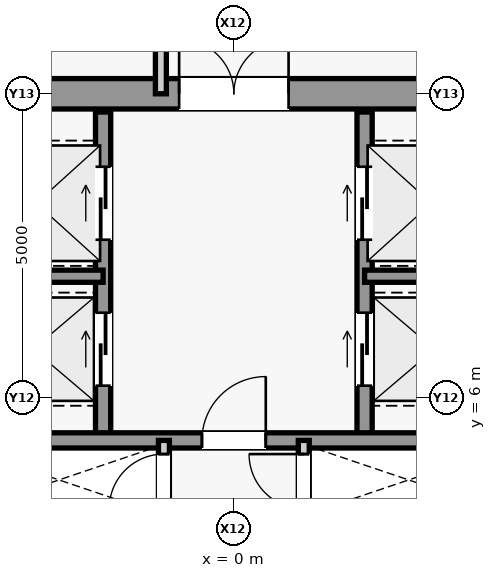
"""IFC4 building model, lengths in metres.
Left out: names, types, materials, properties, quantities, classifications, styles, units other than length and angle.
Written with IfcOpenShell. Run it as: python <this file> out.ifc"""

import sys

from ifc_helpers import new_model, si_unit, direction, frame, frame_2d, origin, place, context, subcontext, project, spatial, rectangle, extrude, source, transform, mapped, element, fill, save


model = new_model("IFC4")
c1 = context("Model", 3, precision=1e-05, world=origin(), true_north=direction((0.0, 1.0)))
c2 = subcontext(c1, "Body", "Model", "MODEL_VIEW")
j1 = project(units=[si_unit("LENGTHUNIT", "METRE"), si_unit("PLANEANGLEUNIT", "RADIAN")], contexts=[c1])
p1 = place(None, origin())
s1 = spatial("IfcSite", under=j1, at=p1, CompositionType="ELEMENT")
p2 = place(p1, origin())
s2 = spatial("IfcBuilding", under=s1, at=p2, CompositionType="ELEMENT")
p3 = place(p2, frame((0.0, 0.0, 171.1)))
s3 = spatial("IfcBuildingStorey", under=s2, at=p3, CompositionType="ELEMENT", Elevation=171.1)
m1 = source(origin(), c2, "Body", "SweptSolid", [
    extrude(rectangle(XDim=9.2, YDim=0.5, at=frame_2d((4.6, 0.0))), origin(), (0.0, 0.0, 1.0), 3.78),
])
p4 = place(p3, frame((-4.6, 11.0, 0.0), z_axis=(0.0, 0.0, 1.0), x_axis=(1.0, 0.0, 0.0)))
e1 = element("IfcWall", 1, at=p4, inside=s3, PredefinedType="SHEAR", context=c2, shape_type="MappedRepresentation", body=[
    mapped(m1, transform((0.0, 0.0, 0.0), scale=1.0)),
])
m2 = source(origin(), c2, "Body", "SweptSolid", [
    extrude(rectangle(XDim=1.8, YDim=2.25, at=frame_2d((0.9, 1.125))), frame((0.0, 0.26, 0.0), z_axis=(0.0, -1.0, 0.0), x_axis=(1.0, 0.0, 0.0)), (0.0, 0.0, 1.0), 0.52),
])
p5 = place(p4, frame((3.7, 0.0, 0.0)))
e2 = element("IfcOpeningElement", 2, at=p5, cuts=e1, PredefinedType="OPENING", context=c2, shape_type="MappedRepresentation", body=[
    mapped(m2, transform((0.0, 0.0, 0.0), scale=1.0)),
])
m3 = source(origin(), c2, "Body", "SweptSolid", [
    extrude(rectangle(XDim=5.4, YDim=0.25, at=frame_2d((2.7, 0.0))), origin(), (0.0, 0.0, 1.0), 3.78),
])
p6 = place(p3, frame((-2.15, 5.3, 0.0), z_axis=(0.0, 0.0, 1.0), x_axis=(0.0, 1.0, 0.0)))
e3 = element("IfcWall", 3, at=p6, inside=s3, PredefinedType="SHEAR", context=c2, shape_type="MappedRepresentation", body=[
    mapped(m3, transform((0.0, 0.0, 0.0), scale=1.0)),
])
m4 = source(origin(), c2, "Body", "SweptSolid", [
    extrude(rectangle(XDim=1.2, YDim=2.3, at=frame_2d((0.6, 1.15))), frame((0.0, 0.135, 0.0), z_axis=(0.0, -1.0, 0.0), x_axis=(1.0, 0.0, 0.0)), (0.0, 0.0, 1.0), 0.27),
])
p7 = place(p6, frame((3.3, 0.0, 0.0)))
e4 = element("IfcOpeningElement", 4, at=p7, cuts=e3, PredefinedType="OPENING", context=c2, shape_type="MappedRepresentation", body=[
    mapped(m4, transform((0.0, 0.0, 0.0), scale=1.0)),
])
p8 = place(p6, frame((0.9, 0.0, 0.0)))
e5 = element("IfcOpeningElement", 5, at=p8, cuts=e3, PredefinedType="OPENING", context=c2, shape_type="MappedRepresentation", body=[
    mapped(m4, transform((0.0, 0.0, 0.0), scale=1.0)),
])
p9 = place(p3, frame((2.15, 5.3, 0.0), z_axis=(0.0, 0.0, 1.0), x_axis=(0.0, 1.0, 0.0)))
e6 = element("IfcWall", 6, at=p9, inside=s3, PredefinedType="SHEAR", context=c2, shape_type="MappedRepresentation", body=[
    mapped(m3, transform((0.0, 0.0, 0.0), scale=1.0)),
])
p10 = place(p9, frame((3.3, 0.0, 0.0)))
e7 = element("IfcOpeningElement", 7, at=p10, cuts=e6, PredefinedType="OPENING", context=c2, shape_type="MappedRepresentation", body=[
    mapped(m4, transform((0.0, 0.0, 0.0), scale=1.0)),
])
p11 = place(p9, frame((0.9, 0.0, 0.0)))
e8 = element("IfcOpeningElement", 8, at=p11, cuts=e6, PredefinedType="OPENING", context=c2, shape_type="MappedRepresentation", body=[
    mapped(m4, transform((0.0, 0.0, 0.0), scale=1.0)),
])
m5 = source(origin(), c2, "Body", "SweptSolid", [
    extrude(rectangle(XDim=2.45, YDim=0.2, at=frame_2d((1.225, 0.0))), origin(), (0.0, 0.0, 1.0), 3.78),
])
for number, where, z_axis, x_axis in (
    (9, (-4.6, 8.0, 0.0), (0.0, 0.0, 1.0), (1.0, 0.0, 0.0)),
    (10, (2.15, 8.0, 0.0), (0.0, 0.0, 1.0), (1.0, 0.0, 0.0)),
):
    element("IfcWall", number, at=place(p3, frame(where, z_axis=z_axis, x_axis=x_axis)), inside=s3, PredefinedType="SHEAR", context=c2, shape_type="MappedRepresentation", body=[
        mapped(m5, transform((0.0, 0.0, 0.0), scale=1.0)),
    ])
m6 = source(origin(), c2, "Body", "SweptSolid", [
    extrude(rectangle(XDim=9.2, YDim=0.25, at=frame_2d((4.6, 0.0))), origin(), (0.0, 0.0, 1.0), 3.78),
])
p12 = place(p3, frame((-4.6, 5.3, 0.0), z_axis=(0.0, 0.0, 1.0), x_axis=(1.0, 0.0, 0.0)))
e11 = element("IfcWall", 11, at=p12, inside=s3, PredefinedType="SHEAR", context=c2, shape_type="MappedRepresentation", body=[
    mapped(m6, transform((0.0, 0.0, 0.0), scale=1.0)),
])
m7 = source(origin(), c2, "Body", "SweptSolid", [
    extrude(rectangle(XDim=1.05, YDim=2.2, at=frame_2d((0.525, 1.1))), frame((0.0, 0.135, 0.0), z_axis=(0.0, -1.0, 0.0), x_axis=(1.0, 0.0, 0.0)), (0.0, 0.0, 1.0), 0.27),
])
p13 = place(p12, frame((4.075, 0.0, 0.0)))
e12 = element("IfcOpeningElement", 12, at=p13, cuts=e11, PredefinedType="OPENING", context=c2, shape_type="MappedRepresentation", body=[
    mapped(m7, transform((0.0, 0.0, 0.0), scale=1.0)),
])
m8 = source(origin(), c2, "Body", "SweptSolid", [
    extrude(rectangle(XDim=10.6, YDim=0.18, at=frame_2d((5.3, 0.0))), origin(), (0.0, 0.0, 1.0), 3.78),
])
p14 = place(p3, frame((-1.15, -5.3, 0.0), z_axis=(0.0, 0.0, 1.0), x_axis=(0.0, 1.0, 0.0)))
e13 = element("IfcWall", 13, at=p14, inside=s3, PredefinedType="PARTITIONING", context=c2, shape_type="MappedRepresentation", body=[
    mapped(m8, transform((0.0, 0.0, 0.0), scale=1.0)),
])
m9 = source(origin(), c2, "Body", "SweptSolid", [
    extrude(rectangle(XDim=0.9, YDim=2.15, at=frame_2d((0.45, 1.075))), frame((0.0, 0.1, 0.0), z_axis=(0.0, -1.0, 0.0), x_axis=(1.0, 0.0, 0.0)), (0.0, 0.0, 1.0), 0.2),
])
p15 = place(p14, frame((1.3, 0.0, 0.0)))
e14 = element("IfcOpeningElement", 14, at=p15, cuts=e13, PredefinedType="OPENING", context=c2, shape_type="MappedRepresentation", body=[
    mapped(m9, transform((0.0, 0.0, 0.0), scale=1.0)),
])
p16 = place(p14, frame((4.9, 0.0, 0.0)))
e15 = element("IfcOpeningElement", 15, at=p16, cuts=e13, PredefinedType="OPENING", context=c2, shape_type="MappedRepresentation", body=[
    mapped(m9, transform((0.0, 0.0, 0.0), scale=1.0)),
])
p17 = place(p14, frame((7.8, 0.0, 0.0)))
e16 = element("IfcOpeningElement", 16, at=p17, cuts=e13, PredefinedType="OPENING", context=c2, shape_type="MappedRepresentation", body=[
    mapped(m9, transform((0.0, 0.0, 0.0), scale=1.0)),
])
p18 = place(p14, frame((9.475, 0.0, 0.0)))
e17 = element("IfcOpeningElement", 17, at=p18, cuts=e13, PredefinedType="OPENING", context=c2, shape_type="MappedRepresentation", body=[
    mapped(m9, transform((0.0, 0.0, 0.0), scale=1.0)),
])
p19 = place(p3, frame((1.15, -5.3, 0.0), z_axis=(0.0, 0.0, 1.0), x_axis=(0.0, 1.0, 0.0)))
e18 = element("IfcWall", 18, at=p19, inside=s3, PredefinedType="PARTITIONING", context=c2, shape_type="MappedRepresentation", body=[
    mapped(m8, transform((0.0, 0.0, 0.0), scale=1.0)),
])
p20 = place(p19, frame((4.2, 0.0, 0.0)))
e19 = element("IfcOpeningElement", 19, at=p20, cuts=e18, PredefinedType="OPENING", context=c2, shape_type="MappedRepresentation", body=[
    mapped(m9, transform((0.0, 0.0, 0.0), scale=1.0)),
])
p21 = place(p19, frame((9.475, 0.0, 0.0)))
e20 = element("IfcOpeningElement", 20, at=p21, cuts=e18, PredefinedType="OPENING", context=c2, shape_type="MappedRepresentation", body=[
    mapped(m9, transform((0.0, 0.0, 0.0), scale=1.0)),
])
m10 = source(origin(), c2, "Body", "SweptSolid", [
    extrude(rectangle(XDim=2.5, YDim=0.18, at=frame_2d((1.25, 0.0))), origin(), (0.0, 0.0, 1.0), 3.78),
])
p22 = place(p3, frame((-1.2, 11.0, 0.0), z_axis=(0.0, 0.0, 1.0), x_axis=(0.0, 1.0, 0.0)))
e21 = element("IfcWall", 21, at=p22, inside=s3, PredefinedType="PARTITIONING", context=c2, shape_type="MappedRepresentation", body=[
    mapped(m10, transform((0.0, 0.0, 0.0), scale=1.0)),
])
m11 = source(origin(), c2, "Body", "SweptSolid", [
    extrude(rectangle(XDim=1.05, YDim=2.2, at=frame_2d((0.525, 1.1))), frame((0.0, 0.025, 0.0), z_axis=(0.0, -1.0, 0.0), x_axis=(1.0, 0.0, 0.0)), (0.0, 0.0, 1.0), 0.05),
])
p23 = place(p13, origin())
e22 = element("IfcDoor", 22, at=p23, inside=s3, OperationType="SINGLE_SWING_RIGHT", PredefinedType="DOOR", context=c2, shape_type="MappedRepresentation", body=[
    mapped(m11, transform((0.0, 0.0, 0.0), scale=1.0)),
])
fill(e12, e22)
m12 = source(origin(), c2, "Body", "SweptSolid", [
    extrude(rectangle(XDim=1.8, YDim=2.25, at=frame_2d((0.9, 1.125))), frame((0.0, 0.025, 0.0), z_axis=(0.0, -1.0, 0.0), x_axis=(1.0, 0.0, 0.0)), (0.0, 0.0, 1.0), 0.05),
])
p24 = place(p5, origin())
e23 = element("IfcDoor", 23, at=p24, inside=s3, OperationType="SINGLE_SWING_RIGHT", PredefinedType="DOOR", context=c2, shape_type="MappedRepresentation", body=[
    mapped(m12, transform((0.0, 0.0, 0.0), scale=1.0)),
])
fill(e2, e23)
m13 = source(origin(), c2, "Body", "SweptSolid", [
    extrude(rectangle(XDim=0.9, YDim=2.15, at=frame_2d((0.45, 1.075))), frame((0.0, 0.025, 0.0), z_axis=(0.0, -1.0, 0.0), x_axis=(1.0, 0.0, 0.0)), (0.0, 0.0, 1.0), 0.05),
])
p25 = place(p18, origin())
e24 = element("IfcDoor", 24, at=p25, inside=s3, OperationType="SINGLE_SWING_LEFT", PredefinedType="DOOR", context=c2, shape_type="MappedRepresentation", body=[
    mapped(m13, transform((0.0, 0.0, 0.0), scale=1.0)),
])
fill(e17, e24)
p26 = place(p21, origin())
e25 = element("IfcDoor", 25, at=p26, inside=s3, OperationType="SINGLE_SWING_RIGHT", PredefinedType="DOOR", context=c2, shape_type="MappedRepresentation", body=[
    mapped(m13, transform((0.0, 0.0, 0.0), scale=1.0)),
])
fill(e20, e25)
m14 = source(origin(), c2, "Body", "SweptSolid", [
    extrude(rectangle(XDim=1.2, YDim=2.3, at=frame_2d((0.6, 1.15))), frame((0.0, 0.025, 0.0), z_axis=(0.0, -1.0, 0.0), x_axis=(1.0, 0.0, 0.0)), (0.0, 0.0, 1.0), 0.05),
])
p27 = place(p7, origin())
e26 = element("IfcDoor", 26, at=p27, inside=s3, OperationType="SLIDING_TO_LEFT", PredefinedType="DOOR", context=c2, shape_type="MappedRepresentation", body=[
    mapped(m14, transform((0.0, 0.0, 0.0), scale=1.0)),
])
fill(e4, e26)
p28 = place(p10, origin())
e27 = element("IfcDoor", 27, at=p28, inside=s3, OperationType="SLIDING_TO_LEFT", PredefinedType="DOOR", context=c2, shape_type="MappedRepresentation", body=[
    mapped(m14, transform((0.0, 0.0, 0.0), scale=1.0)),
])
fill(e7, e27)
p29 = place(p8, origin())
e28 = element("IfcDoor", 28, at=p29, inside=s3, OperationType="SLIDING_TO_LEFT", PredefinedType="DOOR", context=c2, shape_type="MappedRepresentation", body=[
    mapped(m14, transform((0.0, 0.0, 0.0), scale=1.0)),
])
fill(e5, e28)
p30 = place(p11, origin())
e29 = element("IfcDoor", 29, at=p30, inside=s3, OperationType="SLIDING_TO_LEFT", PredefinedType="DOOR", context=c2, shape_type="MappedRepresentation", body=[
    mapped(m14, transform((0.0, 0.0, 0.0), scale=1.0)),
])
fill(e8, e29)
save(model, sys.argv[1])
